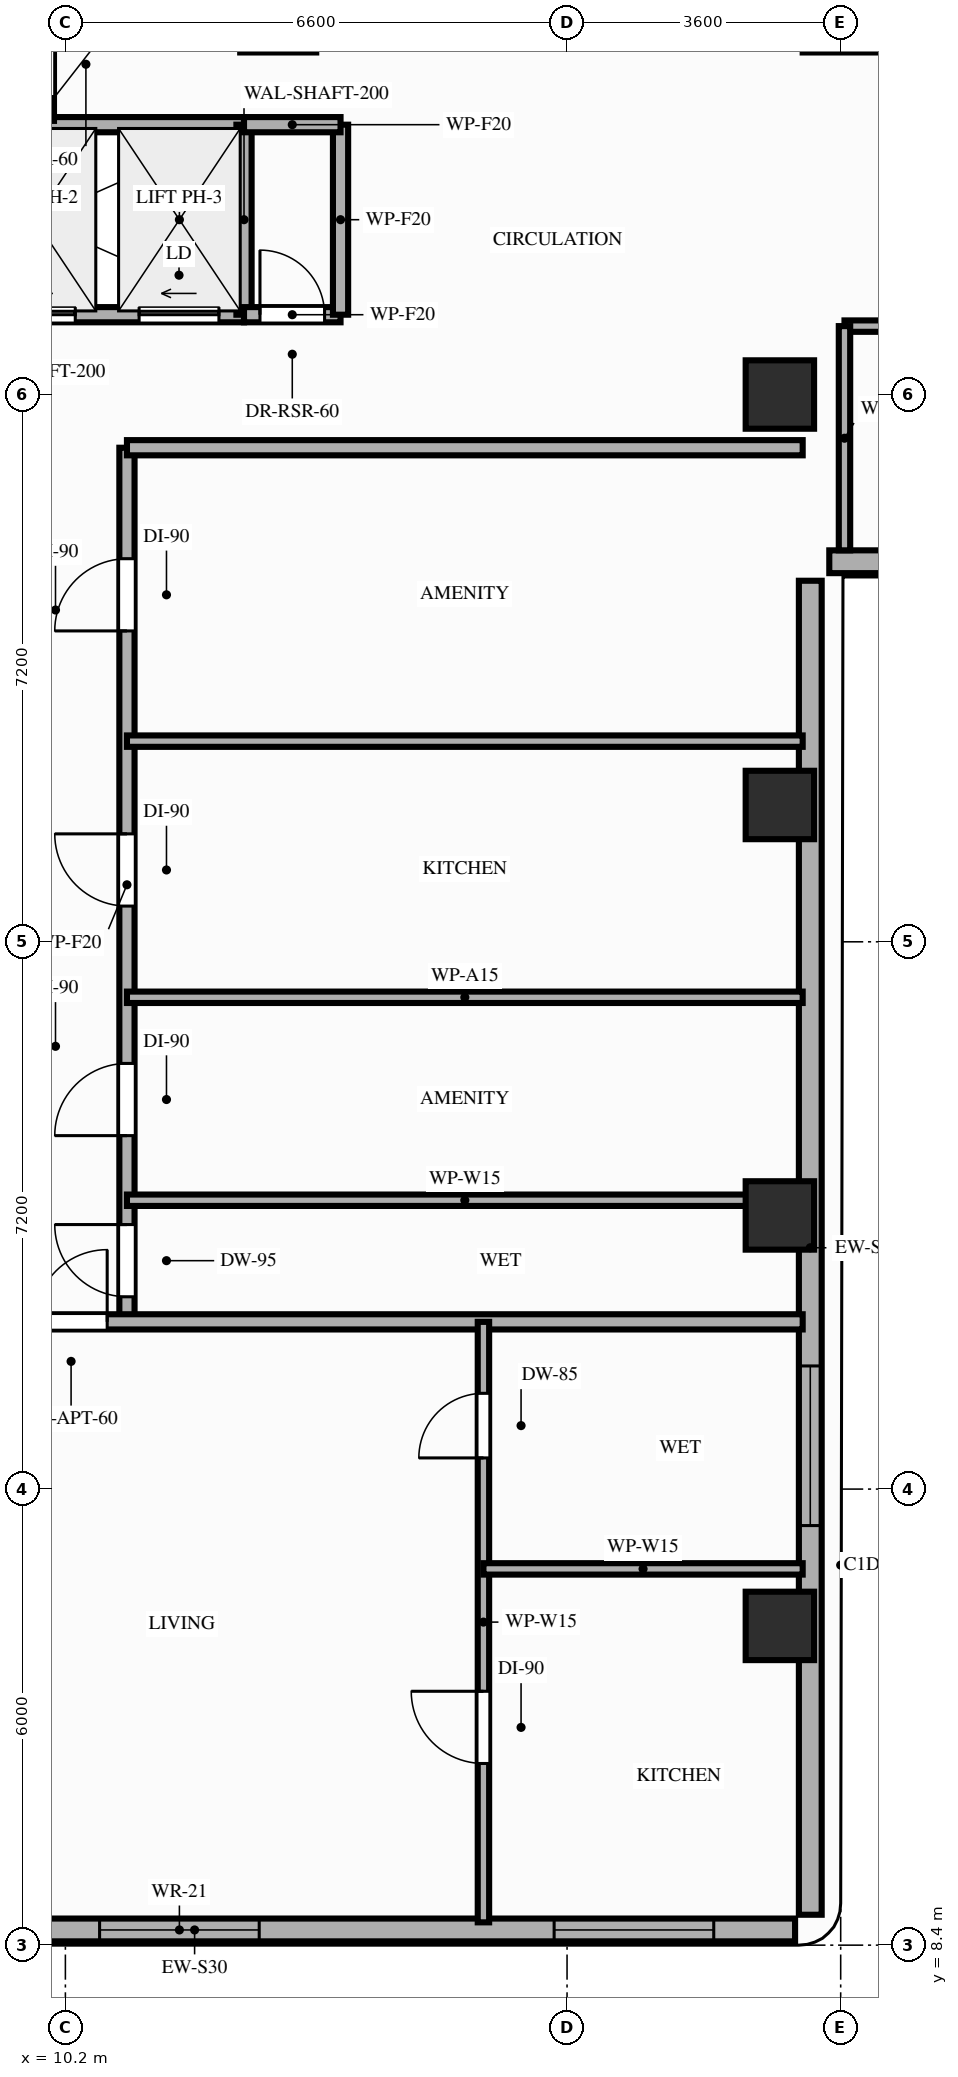
"""IFC4 building model, lengths in metres.
Left out: names, types, materials, properties, quantities, classifications, styles, units other than length and angle.
Written with IfcOpenShell. Run it as: python <this file> out.ifc"""

import sys

from ifc_helpers import new_model, si_unit, direction, frame, frame_2d, origin, origin_2d, place, context, subcontext, project, spatial, rectangle, extrude, element, fill, save


model = new_model("IFC4")
c1 = context("Model", 3, precision=1e-05, world=origin(), true_north=direction((0.0, 1.0)))
c2 = subcontext(c1, "Body", "Model", "MODEL_VIEW")
j1 = project(units=[si_unit("LENGTHUNIT", "METRE"), si_unit("PLANEANGLEUNIT", "RADIAN")], contexts=[c1])
p1 = place(None, origin())
s1 = spatial("IfcSite", under=j1, at=p1, CompositionType="ELEMENT")
p2 = place(p1, origin())
s2 = spatial("IfcBuilding", under=s1, at=p2, CompositionType="ELEMENT")
p3 = place(p2, frame((0.0, 0.0, 182.4)))
s3 = spatial("IfcBuildingStorey", under=s2, at=p3, CompositionType="ELEMENT", Elevation=182.4)
for number, where, z_axis, x_axis in (
    (1, (19.6, 12.6, 0.0), (0.0, 0.0, 1.0), (1.0, 0.0, 0.0)),
    (2, (19.6, 18.0, 0.0), (0.0, 0.0, 1.0), (1.0, 0.0, 0.0)),
    (3, (19.6, 23.4, 0.0), (0.0, 0.0, 1.0), (1.0, 0.0, 0.0)),
    (4, (19.6, 28.8, 0.0), (0.0, 0.0, 1.0), (1.0, 0.0, 0.0)),
):
    element("IfcColumn", number, at=place(p3, frame(where, z_axis=z_axis, x_axis=x_axis)), inside=s3, PredefinedType="COLUMN", context=c2, shape_type="SweptSolid", body=[
        extrude(rectangle(XDim=0.9, YDim=0.9, at=origin_2d()), origin(), (0.0, 0.0, 1.0), 3.2),
    ])
p4 = place(p3, frame((4.0, 8.6, 0.0), z_axis=(0.0, 0.0, 1.0), x_axis=(1.0, 0.0, 0.0)))
e5 = element("IfcWall", 5, at=p4, inside=s3, PredefinedType="STANDARD", context=c2, shape_type="SweptSolid", body=[
    extrude(rectangle(XDim=15.8, YDim=0.3, at=frame_2d((7.9, 0.0))), origin(), (0.0, 0.0, 1.0), 3.02),
])
p5 = place(p4, frame((6.65, 0.0, 0.85)))
e6 = element("IfcOpeningElement", 6, at=p5, cuts=e5, PredefinedType="OPENING", context=c2, shape_type="SweptSolid", body=[
    extrude(rectangle(XDim=2.1, YDim=1.8, at=frame_2d((1.05, 0.9))), frame((0.0, 0.16, 0.0), z_axis=(0.0, -1.0, 0.0), x_axis=(1.0, 0.0, 0.0)), (0.0, 0.0, 1.0), 0.32),
])
p6 = place(p4, frame((12.63, 0.0, 0.85)))
e7 = element("IfcOpeningElement", 7, at=p6, cuts=e5, PredefinedType="OPENING", context=c2, shape_type="SweptSolid", body=[
    extrude(rectangle(XDim=2.1, YDim=1.8, at=frame_2d((1.05, 0.9))), frame((0.0, 0.16, 0.0), z_axis=(0.0, -1.0, 0.0), x_axis=(1.0, 0.0, 0.0)), (0.0, 0.0, 1.0), 0.32),
])
p7 = place(p3, frame((20.0, 8.8, 0.0), z_axis=(0.0, 0.0, 1.0), x_axis=(0.0, 1.0, 0.0)))
e8 = element("IfcWall", 8, at=p7, inside=s3, PredefinedType="STANDARD", context=c2, shape_type="SweptSolid", body=[
    extrude(rectangle(XDim=17.55, YDim=0.3, at=frame_2d((8.775, 0.0))), origin(), (0.0, 0.0, 1.0), 2.45),
])
p8 = place(p7, frame((5.12, 0.0, 0.85)))
e9 = element("IfcOpeningElement", 9, at=p8, cuts=e8, PredefinedType="OPENING", context=c2, shape_type="SweptSolid", body=[
    extrude(rectangle(XDim=2.1, YDim=1.35, at=frame_2d((1.05, 0.675))), frame((0.0, 0.16, 0.0), z_axis=(0.0, -1.0, 0.0), x_axis=(1.0, 0.0, 0.0)), (0.0, 0.0, 1.0), 0.32),
])
p9 = place(p3, frame((20.25, 26.6, 0.0), z_axis=(0.0, 0.0, 1.0), x_axis=(1.0, 0.0, 0.0)))
e10 = element("IfcWall", 10, at=p9, inside=s3, PredefinedType="STANDARD", context=c2, shape_type="SweptSolid", body=[
    extrude(rectangle(XDim=21.35, YDim=0.3, at=frame_2d((10.675, 0.0))), origin(), (0.0, 0.0, 1.0), 2.71),
])
p10 = place(p9, frame((18.43, 0.0, 0.85)))
e11 = element("IfcOpeningElement", 11, at=p10, cuts=e10, PredefinedType="OPENING", context=c2, shape_type="SweptSolid", body=[
    extrude(rectangle(XDim=2.1, YDim=1.61, at=frame_2d((1.05, 0.805))), frame((0.0, 0.16, 0.0), z_axis=(0.0, -1.0, 0.0), x_axis=(1.0, 0.0, 0.0)), (0.0, 0.0, 1.0), 0.32),
])
p11 = place(p9, frame((2.1, 0.0, 0.85)))
e12 = element("IfcOpeningElement", 12, at=p11, cuts=e10, PredefinedType="OPENING", context=c2, shape_type="SweptSolid", body=[
    extrude(rectangle(XDim=2.1, YDim=1.61, at=frame_2d((1.05, 0.805))), frame((0.0, 0.16, 0.0), z_axis=(0.0, -1.0, 0.0), x_axis=(1.0, 0.0, 0.0)), (0.0, 0.0, 1.0), 0.32),
])
p12 = place(p9, frame((7.6, 0.0, 0.85)))
e13 = element("IfcOpeningElement", 13, at=p12, cuts=e10, PredefinedType="OPENING", context=c2, shape_type="SweptSolid", body=[
    extrude(rectangle(XDim=2.1, YDim=1.61, at=frame_2d((1.05, 0.805))), frame((0.0, 0.16, 0.0), z_axis=(0.0, -1.0, 0.0), x_axis=(1.0, 0.0, 0.0)), (0.0, 0.0, 1.0), 0.32),
])
p13 = place(p3, frame((7.0, 29.85, 0.0), z_axis=(0.0, 0.0, 1.0), x_axis=(1.0, 0.0, 0.0)))
e14 = element("IfcWall", 14, at=p13, inside=s3, PredefinedType="MOVABLE", context=c2, shape_type="SweptSolid", body=[
    extrude(rectangle(XDim=5.55, YDim=0.2, at=frame_2d((2.775, 0.0))), origin(), (0.0, 0.0, 1.0), 3.02),
])
p14 = place(p13, frame((0.38, 0.0, 0.0)))
e15 = element("IfcOpeningElement", 15, at=p14, cuts=e14, PredefinedType="OPENING", context=c2, shape_type="SweptSolid", body=[
    extrude(rectangle(XDim=1.05, YDim=2.15, at=frame_2d((0.525, 1.075))), frame((0.0, 0.11, 0.0), z_axis=(0.0, -1.0, 0.0), x_axis=(1.0, 0.0, 0.0)), (0.0, 0.0, 1.0), 0.22),
])
p15 = place(p13, frame((2.28, 0.0, 0.0)))
e16 = element("IfcOpeningElement", 16, at=p15, cuts=e14, PredefinedType="OPENING", context=c2, shape_type="SweptSolid", body=[
    extrude(rectangle(XDim=1.05, YDim=2.15, at=frame_2d((0.525, 1.075))), frame((0.0, 0.11, 0.0), z_axis=(0.0, -1.0, 0.0), x_axis=(1.0, 0.0, 0.0)), (0.0, 0.0, 1.0), 0.22),
])
p16 = place(p13, frame((4.17, 0.0, 0.0)))
e17 = element("IfcOpeningElement", 17, at=p16, cuts=e14, PredefinedType="OPENING", context=c2, shape_type="SweptSolid", body=[
    extrude(rectangle(XDim=1.05, YDim=2.15, at=frame_2d((0.525, 1.075))), frame((0.0, 0.11, 0.0), z_axis=(0.0, -1.0, 0.0), x_axis=(1.0, 0.0, 0.0)), (0.0, 0.0, 1.0), 0.22),
])
p17 = place(p3, frame((7.0, 32.35, 0.0), z_axis=(0.0, 0.0, 1.0), x_axis=(1.0, 0.0, 0.0)))
e18 = element("IfcWall", 18, at=p17, inside=s3, PredefinedType="MOVABLE", context=c2, shape_type="SweptSolid", body=[
    extrude(rectangle(XDim=5.55, YDim=0.2, at=frame_2d((2.775, 0.0))), origin(), (0.0, 0.0, 1.0), 3.02),
])
p18 = place(p3, frame((12.55, 29.85, 0.0), z_axis=(0.0, 0.0, 1.0), x_axis=(0.0, 1.0, 0.0)))
e19 = element("IfcWall", 19, at=p18, inside=s3, PredefinedType="MOVABLE", context=c2, shape_type="SweptSolid", body=[
    extrude(rectangle(XDim=2.5, YDim=0.2, at=frame_2d((1.25, 0.0))), origin(), (0.0, 0.0, 1.0), 3.02),
])
p19 = place(p3, frame((9.95, 32.4, 0.0), z_axis=(0.0, 0.0, 1.0), x_axis=(0.0, 1.0, 0.0)))
e20 = element("IfcWall", 20, at=p19, inside=s3, PredefinedType="PARTITIONING", context=c2, shape_type="SweptSolid", body=[
    extrude(rectangle(XDim=1.52, YDim=0.2, at=frame_2d((0.76, 0.0))), origin(), (0.0, 0.0, 1.0), 2.45),
])
p20 = place(p19, frame((0.32, 0.0, 0.0)))
e21 = element("IfcOpeningElement", 21, at=p20, cuts=e20, PredefinedType="OPENING", context=c2, shape_type="SweptSolid", body=[
    extrude(rectangle(XDim=0.85, YDim=2.05, at=frame_2d((0.425, 1.025))), frame((0.0, 0.11, 0.0), z_axis=(0.0, -1.0, 0.0), x_axis=(1.0, 0.0, 0.0)), (0.0, 0.0, 1.0), 0.22),
])
p21 = place(p3, frame((12.55, 29.85, 0.0), z_axis=(0.0, 0.0, 1.0), x_axis=(1.0, 0.0, 0.0)))
e22 = element("IfcWall", 22, at=p21, inside=s3, PredefinedType="PARTITIONING", context=c2, shape_type="SweptSolid", body=[
    extrude(rectangle(XDim=1.27, YDim=0.2, at=frame_2d((0.635, 0.0))), origin(), (0.0, 0.0, 1.0), 3.02),
])
p22 = place(p21, frame((0.21, 0.0, 0.0)))
e23 = element("IfcOpeningElement", 23, at=p22, cuts=e22, PredefinedType="OPENING", context=c2, shape_type="SweptSolid", body=[
    extrude(rectangle(XDim=0.85, YDim=2.05, at=frame_2d((0.425, 1.025))), frame((0.0, 0.11, 0.0), z_axis=(0.0, -1.0, 0.0), x_axis=(1.0, 0.0, 0.0)), (0.0, 0.0, 1.0), 0.22),
])
p23 = place(p3, frame((13.82, 29.85, 0.0), z_axis=(0.0, 0.0, 1.0), x_axis=(0.0, 1.0, 0.0)))
e24 = element("IfcWall", 24, at=p23, inside=s3, PredefinedType="PARTITIONING", context=c2, shape_type="SweptSolid", body=[
    extrude(rectangle(XDim=2.5, YDim=0.2, at=frame_2d((1.25, 0.0))), origin(), (0.0, 0.0, 1.0), 3.02),
])
p24 = place(p3, frame((12.55, 32.35, 0.0), z_axis=(0.0, 0.0, 1.0), x_axis=(1.0, 0.0, 0.0)))
e25 = element("IfcWall", 25, at=p24, inside=s3, PredefinedType="PARTITIONING", context=c2, shape_type="SweptSolid", body=[
    extrude(rectangle(XDim=1.27, YDim=0.2, at=frame_2d((0.635, 0.0))), origin(), (0.0, 0.0, 1.0), 3.02),
])
p25 = place(p3, frame((11.01, 16.6, 0.0), z_axis=(0.0, 0.0, 1.0), x_axis=(0.0, 1.0, 0.0)))
e26 = element("IfcWall", 26, at=p25, inside=s3, PredefinedType="PARTITIONING", context=c2, shape_type="SweptSolid", body=[
    extrude(rectangle(XDim=11.5, YDim=0.2, at=frame_2d((5.75, 0.0))), origin(), (0.0, 0.0, 1.0), 2.45),
])
p26 = place(p25, frame((0.33, 0.0, 0.0)))
e27 = element("IfcOpeningElement", 27, at=p26, cuts=e26, PredefinedType="OPENING", context=c2, shape_type="SweptSolid", body=[
    extrude(rectangle(XDim=0.95, YDim=2.1, at=frame_2d((0.475, 1.05))), frame((0.0, 0.11, 0.0), z_axis=(0.0, -1.0, 0.0), x_axis=(1.0, 0.0, 0.0)), (0.0, 0.0, 1.0), 0.22),
])
p27 = place(p25, frame((2.45, 0.0, 0.0)))
e28 = element("IfcOpeningElement", 28, at=p27, cuts=e26, PredefinedType="OPENING", context=c2, shape_type="SweptSolid", body=[
    extrude(rectangle(XDim=0.95, YDim=2.15, at=frame_2d((0.475, 1.075))), frame((0.0, 0.11, 0.0), z_axis=(0.0, -1.0, 0.0), x_axis=(1.0, 0.0, 0.0)), (0.0, 0.0, 1.0), 0.22),
])
p28 = place(p25, frame((5.47, 0.0, 0.0)))
e29 = element("IfcOpeningElement", 29, at=p28, cuts=e26, PredefinedType="OPENING", context=c2, shape_type="SweptSolid", body=[
    extrude(rectangle(XDim=0.95, YDim=2.15, at=frame_2d((0.475, 1.075))), frame((0.0, 0.11, 0.0), z_axis=(0.0, -1.0, 0.0), x_axis=(1.0, 0.0, 0.0)), (0.0, 0.0, 1.0), 0.22),
])
p29 = place(p25, frame((9.09, 0.0, 0.0)))
e30 = element("IfcOpeningElement", 30, at=p29, cuts=e26, PredefinedType="OPENING", context=c2, shape_type="SweptSolid", body=[
    extrude(rectangle(XDim=0.95, YDim=2.15, at=frame_2d((0.475, 1.075))), frame((0.0, 0.11, 0.0), z_axis=(0.0, -1.0, 0.0), x_axis=(1.0, 0.0, 0.0)), (0.0, 0.0, 1.0), 0.22),
])
p30 = place(p3, frame((3.9, 16.6, 0.0), z_axis=(0.0, 0.0, 1.0), x_axis=(1.0, 0.0, 0.0)))
e31 = element("IfcWall", 31, at=p30, inside=s3, PredefinedType="PARTITIONING", context=c2, shape_type="SweptSolid", body=[
    extrude(rectangle(XDim=16.0, YDim=0.2, at=frame_2d((8.0, 0.0))), origin(), (0.0, 0.0, 1.0), 2.45),
])
p31 = place(p30, frame((5.9, 0.0, 0.0)))
e32 = element("IfcOpeningElement", 32, at=p31, cuts=e31, PredefinedType="OPENING", context=c2, shape_type="SweptSolid", body=[
    extrude(rectangle(XDim=0.95, YDim=2.15, at=frame_2d((0.475, 1.075))), frame((0.0, 0.11, 0.0), z_axis=(0.0, -1.0, 0.0), x_axis=(1.0, 0.0, 0.0)), (0.0, 0.0, 1.0), 0.22),
])
p32 = place(p3, frame((11.01, 28.1, 0.0), z_axis=(0.0, 0.0, 1.0), x_axis=(1.0, 0.0, 0.0)))
e33 = element("IfcWall", 33, at=p32, inside=s3, PredefinedType="PARTITIONING", context=c2, shape_type="SweptSolid", body=[
    extrude(rectangle(XDim=8.89, YDim=0.2, at=frame_2d((4.445, 0.0))), origin(), (0.0, 0.0, 1.0), 2.45),
])
p33 = place(p3, frame((20.45, 29.7, 0.0), z_axis=(0.0, 0.0, 1.0), x_axis=(1.0, 0.0, 0.0)))
e34 = element("IfcWall", 34, at=p33, inside=s3, PredefinedType="PARTITIONING", context=c2, shape_type="SweptSolid", body=[
    extrude(rectangle(XDim=6.7, YDim=0.15, at=frame_2d((3.35, 0.0))), origin(), (0.0, 0.0, 1.0), 3.02),
])
p34 = place(p33, frame((2.8, 0.0, 0.0)))
e35 = element("IfcOpeningElement", 35, at=p34, cuts=e34, PredefinedType="OPENING", context=c2, shape_type="SweptSolid", body=[
    extrude(rectangle(XDim=0.95, YDim=2.15, at=frame_2d((0.475, 1.075))), frame((0.0, 0.085, 0.0), z_axis=(0.0, -1.0, 0.0), x_axis=(1.0, 0.0, 0.0)), (0.0, 0.0, 1.0), 0.17),
])
p35 = place(p3, frame((20.45, 26.75, 0.0), z_axis=(0.0, 0.0, 1.0), x_axis=(0.0, 1.0, 0.0)))
e36 = element("IfcWall", 36, at=p35, inside=s3, PredefinedType="PARTITIONING", context=c2, shape_type="SweptSolid", body=[
    extrude(rectangle(XDim=2.95, YDim=0.15, at=frame_2d((1.475, 0.0))), origin(), (0.0, 0.0, 1.0), 2.45),
])
p36 = place(p3, frame((15.7, 8.7, 0.0), z_axis=(0.0, 0.0, 1.0), x_axis=(0.0, 1.0, 0.0)))
e37 = element("IfcWall", 37, at=p36, inside=s3, PredefinedType="PARTITIONING", context=c2, shape_type="SweptSolid", body=[
    extrude(rectangle(XDim=7.9, YDim=0.15, at=frame_2d((3.95, 0.0))), origin(), (0.0, 0.0, 1.0), 2.45),
])
p37 = place(p36, frame((2.09, 0.0, 0.0)))
e38 = element("IfcOpeningElement", 38, at=p37, cuts=e37, PredefinedType="OPENING", context=c2, shape_type="SweptSolid", body=[
    extrude(rectangle(XDim=0.95, YDim=2.15, at=frame_2d((0.475, 1.075))), frame((0.0, 0.085, 0.0), z_axis=(0.0, -1.0, 0.0), x_axis=(1.0, 0.0, 0.0)), (0.0, 0.0, 1.0), 0.17),
])
p38 = place(p36, frame((6.11, 0.0, 0.0)))
e39 = element("IfcOpeningElement", 39, at=p38, cuts=e37, PredefinedType="OPENING", context=c2, shape_type="SweptSolid", body=[
    extrude(rectangle(XDim=0.85, YDim=2.1, at=frame_2d((0.425, 1.05))), frame((0.0, 0.085, 0.0), z_axis=(0.0, -1.0, 0.0), x_axis=(1.0, 0.0, 0.0)), (0.0, 0.0, 1.0), 0.17),
])
p39 = place(p3, frame((15.7, 13.35, 0.0), z_axis=(0.0, 0.0, 1.0), x_axis=(1.0, 0.0, 0.0)))
e40 = element("IfcWall", 40, at=p39, inside=s3, PredefinedType="PARTITIONING", context=c2, shape_type="SweptSolid", body=[
    extrude(rectangle(XDim=4.2, YDim=0.15, at=frame_2d((2.1, 0.0))), origin(), (0.0, 0.0, 1.0), 2.45),
])
for number, where, z_axis, x_axis in (
    (41, (11.01, 18.2, 0.0), (0.0, 0.0, 1.0), (1.0, 0.0, 0.0)),
    (42, (11.01, 20.87, 0.0), (0.0, 0.0, 1.0), (1.0, 0.0, 0.0)),
    (43, (11.01, 24.24, 0.0), (0.0, 0.0, 1.0), (1.0, 0.0, 0.0)),
):
    element("IfcWall", number, at=place(p3, frame(where, z_axis=z_axis, x_axis=x_axis)), inside=s3, PredefinedType="PARTITIONING", context=c2, shape_type="SweptSolid", body=[
        extrude(rectangle(XDim=8.89, YDim=0.15, at=frame_2d((4.445, 0.0))), origin(), (0.0, 0.0, 1.0), 2.45),
    ])
p40 = place(p5, origin())
e44 = element("IfcWindow", 44, at=p40, inside=s3, PartitioningType="SINGLE_PANEL", PredefinedType="WINDOW", context=c2, shape_type="SweptSolid", body=[
    extrude(rectangle(XDim=2.1, YDim=1.8, at=frame_2d((1.05, 0.9))), frame((0.0, 0.03, 0.0), z_axis=(0.0, -1.0, 0.0), x_axis=(1.0, 0.0, 0.0)), (0.0, 0.0, 1.0), 0.06),
])
fill(e6, e44)
p41 = place(p6, origin())
e45 = element("IfcWindow", 45, at=p41, inside=s3, PartitioningType="SINGLE_PANEL", PredefinedType="WINDOW", context=c2, shape_type="SweptSolid", body=[
    extrude(rectangle(XDim=2.1, YDim=1.8, at=frame_2d((1.05, 0.9))), frame((0.0, 0.03, 0.0), z_axis=(0.0, -1.0, 0.0), x_axis=(1.0, 0.0, 0.0)), (0.0, 0.0, 1.0), 0.06),
])
fill(e7, e45)
p42 = place(p8, origin())
e46 = element("IfcWindow", 46, at=p42, inside=s3, PartitioningType="SINGLE_PANEL", PredefinedType="WINDOW", context=c2, shape_type="SweptSolid", body=[
    extrude(rectangle(XDim=2.1, YDim=1.35, at=frame_2d((1.05, 0.675))), frame((0.0, 0.03, 0.0), z_axis=(0.0, -1.0, 0.0), x_axis=(1.0, 0.0, 0.0)), (0.0, 0.0, 1.0), 0.06),
])
fill(e9, e46)
p43 = place(p15, origin())
e47 = element("IfcDoor", 47, at=p43, inside=s3, OperationType="SLIDING_TO_LEFT", PredefinedType="DOOR", context=c2, shape_type="SweptSolid", body=[
    extrude(rectangle(XDim=1.05, YDim=2.15, at=frame_2d((0.525, 1.075))), frame((0.0, 0.025, 0.0), z_axis=(0.0, -1.0, 0.0), x_axis=(1.0, 0.0, 0.0)), (0.0, 0.0, 1.0), 0.05),
])
fill(e16, e47)
p44 = place(p16, origin())
e48 = element("IfcDoor", 48, at=p44, inside=s3, OperationType="SLIDING_TO_LEFT", PredefinedType="DOOR", context=c2, shape_type="SweptSolid", body=[
    extrude(rectangle(XDim=1.05, YDim=2.15, at=frame_2d((0.525, 1.075))), frame((0.0, 0.025, 0.0), z_axis=(0.0, -1.0, 0.0), x_axis=(1.0, 0.0, 0.0)), (0.0, 0.0, 1.0), 0.05),
])
fill(e17, e48)
p45 = place(p22, origin())
e49 = element("IfcDoor", 49, at=p45, inside=s3, OperationType="SINGLE_SWING_LEFT", PredefinedType="DOOR", context=c2, shape_type="SweptSolid", body=[
    extrude(rectangle(XDim=0.85, YDim=2.05, at=frame_2d((0.425, 1.025))), frame((0.0, 0.025, 0.0), z_axis=(0.0, -1.0, 0.0), x_axis=(1.0, 0.0, 0.0)), (0.0, 0.0, 1.0), 0.05),
])
fill(e23, e49)
p46 = place(p31, origin())
e50 = element("IfcDoor", 50, at=p46, inside=s3, OperationType="SINGLE_SWING_RIGHT", PredefinedType="DOOR", context=c2, shape_type="SweptSolid", body=[
    extrude(rectangle(XDim=0.95, YDim=2.15, at=frame_2d((0.475, 1.075))), frame((0.0, 0.025, 0.0), z_axis=(0.0, -1.0, 0.0), x_axis=(1.0, 0.0, 0.0)), (0.0, 0.0, 1.0), 0.05),
])
fill(e32, e50)
p47 = place(p37, origin())
e51 = element("IfcDoor", 51, at=p47, inside=s3, OperationType="SINGLE_SWING_RIGHT", PredefinedType="DOOR", context=c2, shape_type="SweptSolid", body=[
    extrude(rectangle(XDim=0.95, YDim=2.15, at=frame_2d((0.475, 1.075))), frame((0.0, 0.025, 0.0), z_axis=(0.0, -1.0, 0.0), x_axis=(1.0, 0.0, 0.0)), (0.0, 0.0, 1.0), 0.05),
])
fill(e38, e51)
p48 = place(p38, origin())
e52 = element("IfcDoor", 52, at=p48, inside=s3, OperationType="SINGLE_SWING_LEFT", PredefinedType="DOOR", context=c2, shape_type="SweptSolid", body=[
    extrude(rectangle(XDim=0.85, YDim=2.1, at=frame_2d((0.425, 1.05))), frame((0.0, 0.025, 0.0), z_axis=(0.0, -1.0, 0.0), x_axis=(1.0, 0.0, 0.0)), (0.0, 0.0, 1.0), 0.05),
])
fill(e39, e52)
p49 = place(p26, origin())
e53 = element("IfcDoor", 53, at=p49, inside=s3, OperationType="SINGLE_SWING_RIGHT", PredefinedType="DOOR", context=c2, shape_type="SweptSolid", body=[
    extrude(rectangle(XDim=0.95, YDim=2.1, at=frame_2d((0.475, 1.05))), frame((0.0, 0.025, 0.0), z_axis=(0.0, -1.0, 0.0), x_axis=(1.0, 0.0, 0.0)), (0.0, 0.0, 1.0), 0.05),
])
fill(e27, e53)
p50 = place(p27, origin())
e54 = element("IfcDoor", 54, at=p50, inside=s3, OperationType="SINGLE_SWING_LEFT", PredefinedType="DOOR", context=c2, shape_type="SweptSolid", body=[
    extrude(rectangle(XDim=0.95, YDim=2.15, at=frame_2d((0.475, 1.075))), frame((0.0, 0.025, 0.0), z_axis=(0.0, -1.0, 0.0), x_axis=(1.0, 0.0, 0.0)), (0.0, 0.0, 1.0), 0.05),
])
fill(e28, e54)
p51 = place(p28, origin())
e55 = element("IfcDoor", 55, at=p51, inside=s3, OperationType="SINGLE_SWING_RIGHT", PredefinedType="DOOR", context=c2, shape_type="SweptSolid", body=[
    extrude(rectangle(XDim=0.95, YDim=2.15, at=frame_2d((0.475, 1.075))), frame((0.0, 0.025, 0.0), z_axis=(0.0, -1.0, 0.0), x_axis=(1.0, 0.0, 0.0)), (0.0, 0.0, 1.0), 0.05),
])
fill(e29, e55)
p52 = place(p29, origin())
e56 = element("IfcDoor", 56, at=p52, inside=s3, OperationType="SINGLE_SWING_LEFT", PredefinedType="DOOR", context=c2, shape_type="SweptSolid", body=[
    extrude(rectangle(XDim=0.95, YDim=2.15, at=frame_2d((0.475, 1.075))), frame((0.0, 0.025, 0.0), z_axis=(0.0, -1.0, 0.0), x_axis=(1.0, 0.0, 0.0)), (0.0, 0.0, 1.0), 0.05),
])
fill(e30, e56)
save(model, sys.argv[1])
